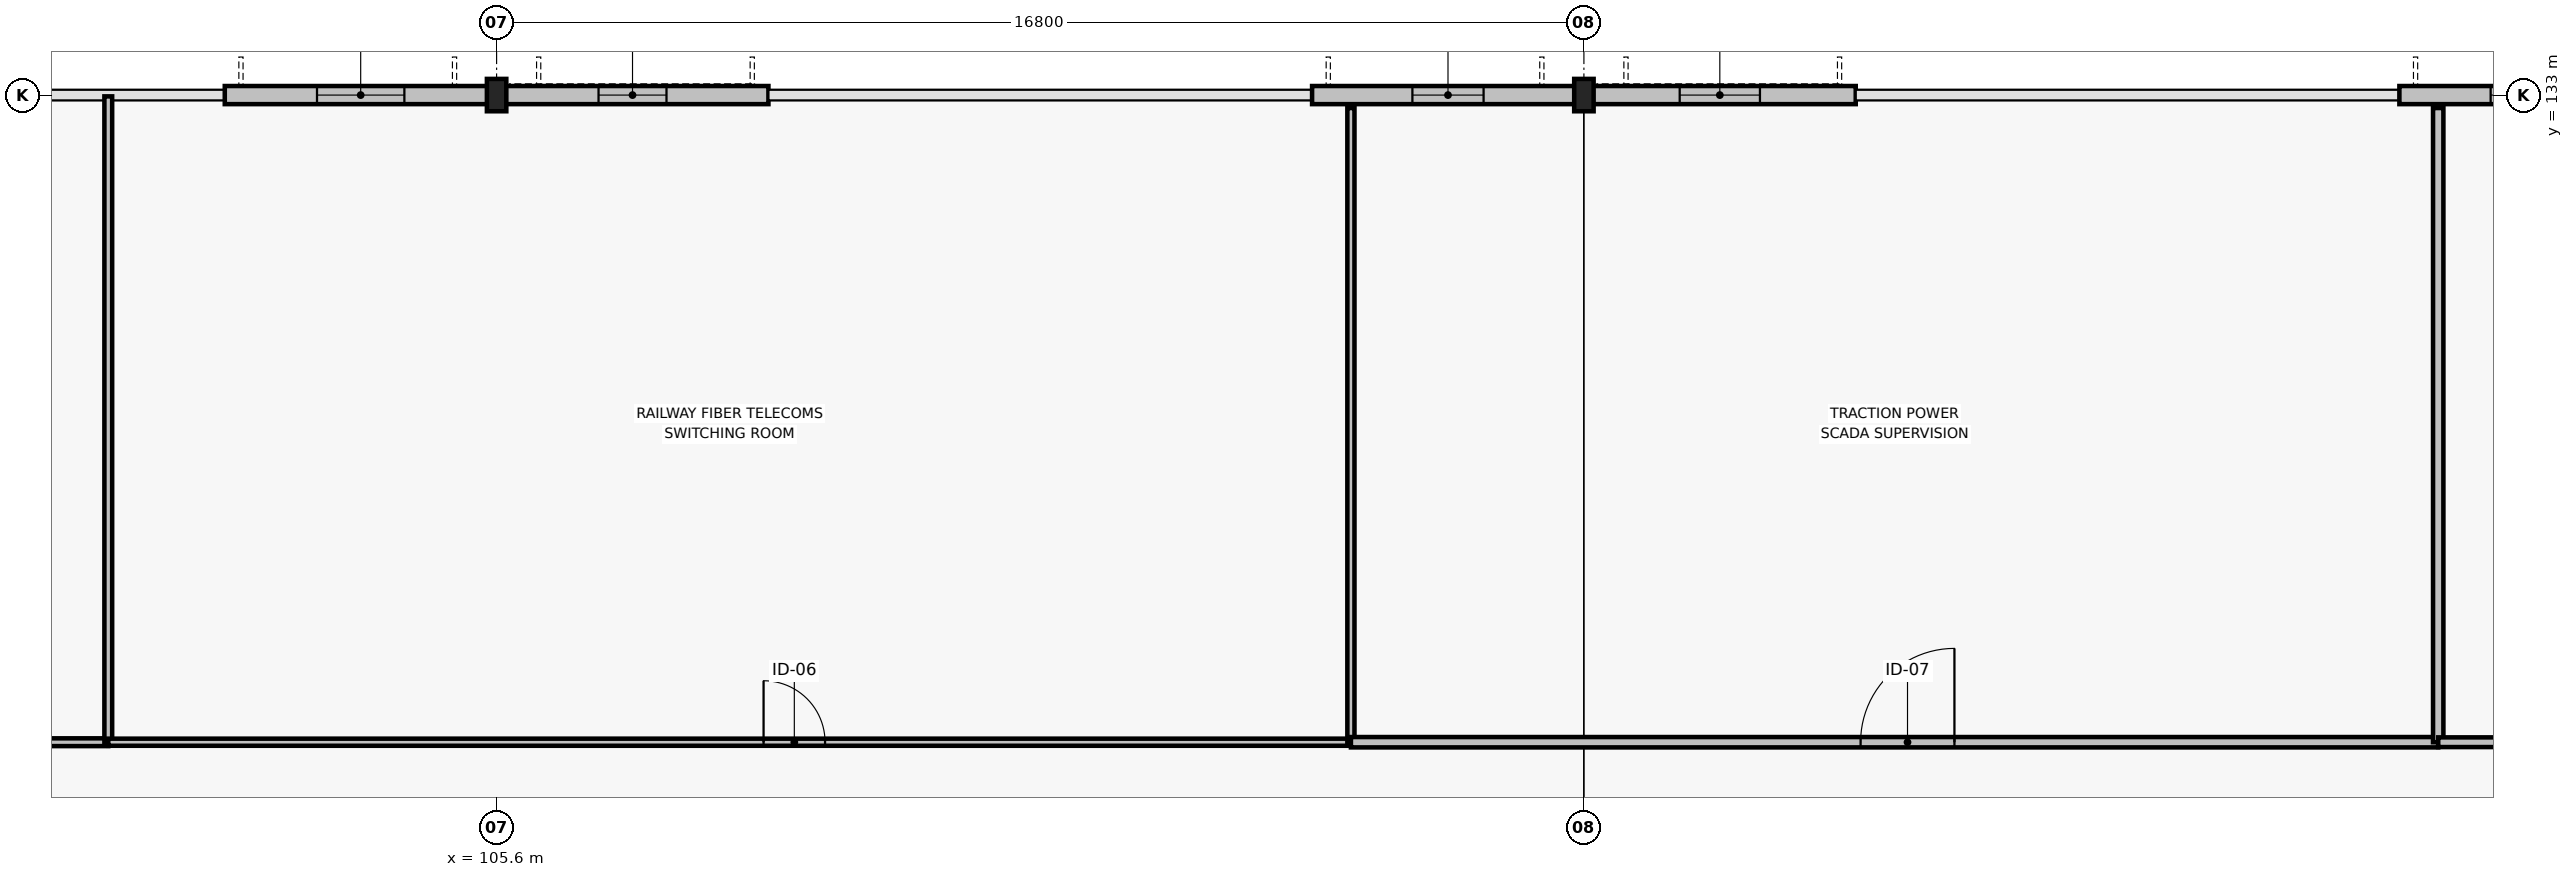
"""IFC4 building model, lengths in metres.
Left out: names, types, materials, properties, quantities, classifications, styles, units other than length and angle.
Written with IfcOpenShell. Run it as: python <this file> out.ifc"""

import sys

from ifc_helpers import new_model, si_unit, direction, frame, frame_2d, origin, origin_2d, place, context, subcontext, project, spatial, rectangle, i_section, extrude, element, fill, save


model = new_model("IFC4")
c1 = context("Model", 3, precision=1e-05, world=origin(), true_north=direction((0.0, 1.0)))
c2 = subcontext(c1, "Body", "Model", "MODEL_VIEW")
j1 = project(units=[si_unit("LENGTHUNIT", "METRE"), si_unit("PLANEANGLEUNIT", "RADIAN")], contexts=[c1])
p1 = place(None, origin())
s1 = spatial("IfcSite", under=j1, at=p1, CompositionType="ELEMENT")
p2 = place(p1, origin())
s2 = spatial("IfcBuilding", under=s1, at=p2, CompositionType="ELEMENT")
p3 = place(p2, frame((0.0, 0.0, 10.8)))
s3 = spatial("IfcBuildingStorey", under=s2, at=p3, CompositionType="ELEMENT", Elevation=10.8)
for number, where, z_axis, x_axis in (
    (1, (105.6, 133.0, 0.0), (0.0, 0.0, 1.0), (1.0, 0.0, 0.0)),
    (2, (122.4, 133.0, 0.0), (0.0, 0.0, 1.0), (1.0, 0.0, 0.0)),
):
    element("IfcColumn", number, at=place(p3, frame(where, z_axis=z_axis, x_axis=x_axis)), inside=s3, PredefinedType="COLUMN", context=c2, shape_type="SweptSolid", body=[
        extrude(i_section(OverallWidth=0.3, OverallDepth=0.5, WebThickness=0.014, FlangeThickness=0.028, FilletRadius=0.027, at=origin_2d()), origin(), (0.0, 0.0, 1.0), 6.0),
    ])
p4 = place(p3, frame((101.4, 133.0, 0.0), z_axis=(0.0, 0.0, 1.0), x_axis=(1.0, 0.0, 0.0)))
e3 = element("IfcWall", 3, at=p4, inside=s3, PredefinedType="STANDARD", context=c2, shape_type="SweptSolid", body=[
    extrude(rectangle(XDim=4.2, YDim=0.28, at=frame_2d((2.1, 0.0))), origin(), (0.0, 0.0, 1.0), 5.405),
])
p5 = place(p4, frame((1.425, 0.0, 0.8)))
e4 = element("IfcOpeningElement", 4, at=p5, cuts=e3, PredefinedType="OPENING", context=c2, shape_type="SweptSolid", body=[
    extrude(rectangle(XDim=1.35, YDim=1.4, at=frame_2d((0.675, 0.7))), frame((0.0, 0.15, 0.0), z_axis=(0.0, -1.0, 0.0), x_axis=(1.0, 0.0, 0.0)), (0.0, 0.0, 1.0), 0.3),
])
p6 = place(p3, frame((105.6, 133.0, 0.0), z_axis=(0.0, 0.0, 1.0), x_axis=(1.0, 0.0, 0.0)))
e5 = element("IfcWall", 5, at=p6, inside=s3, PredefinedType="STANDARD", context=c2, shape_type="SweptSolid", body=[
    extrude(rectangle(XDim=4.2, YDim=0.28, at=frame_2d((2.1, 0.0))), origin(), (0.0, 0.0, 1.0), 5.405),
])
p7 = place(p6, frame((1.575, 0.0, 0.8)))
e6 = element("IfcOpeningElement", 6, at=p7, cuts=e5, PredefinedType="OPENING", context=c2, shape_type="SweptSolid", body=[
    extrude(rectangle(XDim=1.05, YDim=1.35, at=frame_2d((0.525, 0.675))), frame((0.0, 0.15, 0.0), z_axis=(0.0, -1.0, 0.0), x_axis=(1.0, 0.0, 0.0)), (0.0, 0.0, 1.0), 0.3),
])
p8 = place(p3, frame((118.2, 133.0, 0.0), z_axis=(0.0, 0.0, 1.0), x_axis=(1.0, 0.0, 0.0)))
e7 = element("IfcWall", 7, at=p8, inside=s3, PredefinedType="STANDARD", context=c2, shape_type="SweptSolid", body=[
    extrude(rectangle(XDim=4.2, YDim=0.28, at=frame_2d((2.1, 0.0))), origin(), (0.0, 0.0, 1.0), 5.405),
])
p9 = place(p8, frame((1.55, 0.0, 0.8)))
e8 = element("IfcOpeningElement", 8, at=p9, cuts=e7, PredefinedType="OPENING", context=c2, shape_type="SweptSolid", body=[
    extrude(rectangle(XDim=1.1, YDim=1.25, at=frame_2d((0.55, 0.625))), frame((0.0, 0.15, 0.0), z_axis=(0.0, -1.0, 0.0), x_axis=(1.0, 0.0, 0.0)), (0.0, 0.0, 1.0), 0.3),
])
p10 = place(p3, frame((122.4, 133.0, 0.0), z_axis=(0.0, 0.0, 1.0), x_axis=(1.0, 0.0, 0.0)))
e9 = element("IfcWall", 9, at=p10, inside=s3, PredefinedType="STANDARD", context=c2, shape_type="SweptSolid", body=[
    extrude(rectangle(XDim=4.2, YDim=0.28, at=frame_2d((2.1, 0.0))), origin(), (0.0, 0.0, 1.0), 5.405),
])
p11 = place(p10, frame((1.48, 0.0, 0.8)))
e10 = element("IfcOpeningElement", 10, at=p11, cuts=e9, PredefinedType="OPENING", context=c2, shape_type="SweptSolid", body=[
    extrude(rectangle(XDim=1.24, YDim=1.31, at=frame_2d((0.62, 0.655))), frame((0.0, 0.15, 0.0), z_axis=(0.0, -1.0, 0.0), x_axis=(1.0, 0.0, 0.0)), (0.0, 0.0, 1.0), 0.3),
])
p12 = place(p3, frame((135.0, 133.0, 0.0), z_axis=(0.0, 0.0, 1.0), x_axis=(1.0, 0.0, 0.0)))
e11 = element("IfcWall", 11, at=p12, inside=s3, PredefinedType="STANDARD", context=c2, shape_type="SweptSolid", body=[
    extrude(rectangle(XDim=4.2, YDim=0.28, at=frame_2d((2.1, 0.0))), origin(), (0.0, 0.0, 1.0), 5.405),
])
p13 = place(p12, frame((1.41, 0.0, 0.8)))
e12 = element("IfcOpeningElement", 12, at=p13, cuts=e11, PredefinedType="OPENING", context=c2, shape_type="SweptSolid", body=[
    extrude(rectangle(XDim=1.38, YDim=1.37, at=frame_2d((0.69, 0.685))), frame((0.0, 0.15, 0.0), z_axis=(0.0, -1.0, 0.0), x_axis=(1.0, 0.0, 0.0)), (0.0, 0.0, 1.0), 0.3),
])
p14 = place(p3, frame((76.8, 123.0, 0.0), z_axis=(0.0, 0.0, 1.0), x_axis=(1.0, 0.0, 0.0)))
e13 = element("IfcWall", 13, at=p14, inside=s3, PredefinedType="PARTITIONING", context=c2, shape_type="SweptSolid", body=[
    extrude(rectangle(XDim=22.8, YDim=0.12, at=frame_2d((11.4, 0.0))), origin(), (0.0, 0.0, 1.0), 5.8),
])
p15 = place(p14, frame((6.9, 0.0, 0.0)))
e14 = element("IfcOpeningElement", 14, at=p15, cuts=e13, PredefinedType="OPENING", context=c2, shape_type="SweptSolid", body=[
    extrude(rectangle(XDim=1.0, YDim=2.15, at=frame_2d((0.5, 1.075))), frame((0.0, 0.07, 0.0), z_axis=(0.0, -1.0, 0.0), x_axis=(1.0, 0.0, 0.0)), (0.0, 0.0, 1.0), 0.14),
])
p16 = place(p3, frame((99.6, 123.0, 0.0), z_axis=(0.0, 0.0, 1.0), x_axis=(0.0, 1.0, 0.0)))
e15 = element("IfcWall", 15, at=p16, inside=s3, PredefinedType="PARTITIONING", context=c2, shape_type="SweptSolid", body=[
    extrude(rectangle(XDim=9.98, YDim=0.12, at=frame_2d((4.99, 0.0))), origin(), (0.0, 0.0, 1.0), 5.465),
])
p17 = place(p3, frame((99.6, 123.0, 0.0), z_axis=(0.0, 0.0, 1.0), x_axis=(1.0, 0.0, 0.0)))
e16 = element("IfcWall", 16, at=p17, inside=s3, PredefinedType="MOVABLE", context=c2, shape_type="SweptSolid", body=[
    extrude(rectangle(XDim=19.2, YDim=0.11, at=frame_2d((9.6, 0.0))), origin(), (0.0, 0.0, 1.0), 5.8),
])
p18 = place(p17, frame((10.125, 0.0, 0.0)))
e17 = element("IfcOpeningElement", 17, at=p18, cuts=e16, PredefinedType="OPENING", context=c2, shape_type="SweptSolid", body=[
    extrude(rectangle(XDim=0.95, YDim=2.15, at=frame_2d((0.475, 1.075))), frame((0.0, 0.065, 0.0), z_axis=(0.0, -1.0, 0.0), x_axis=(1.0, 0.0, 0.0)), (0.0, 0.0, 1.0), 0.13),
])
p19 = place(p3, frame((118.8, 123.0, 0.0), z_axis=(0.0, 0.0, 1.0), x_axis=(0.0, 1.0, 0.0)))
e18 = element("IfcWall", 18, at=p19, inside=s3, PredefinedType="MOVABLE", context=c2, shape_type="SweptSolid", body=[
    extrude(rectangle(XDim=9.8, YDim=0.11, at=frame_2d((4.9, 0.0))), origin(), (0.0, 0.0, 1.0), 5.8),
])
p20 = place(p3, frame((118.8, 123.0, 0.0), z_axis=(0.0, 0.0, 1.0), x_axis=(1.0, 0.0, 0.0)))
e19 = element("IfcWall", 19, at=p20, inside=s3, PredefinedType="PARTITIONING", context=c2, shape_type="SweptSolid", body=[
    extrude(rectangle(XDim=16.8, YDim=0.16, at=frame_2d((8.4, 0.0))), origin(), (0.0, 0.0, 1.0), 5.8),
])
p21 = place(p20, frame((9.325, 0.0, 0.0), z_axis=(0.0, 0.0, 1.0), x_axis=(-1.0, 0.0, 0.0)))
e20 = element("IfcOpeningElement", 20, at=p21, cuts=e19, PredefinedType="OPENING", context=c2, shape_type="SweptSolid", body=[
    extrude(rectangle(XDim=1.45, YDim=2.25, at=frame_2d((0.725, 1.125))), frame((0.0, 0.09, 0.0), z_axis=(0.0, -1.0, 0.0), x_axis=(1.0, 0.0, 0.0)), (0.0, 0.0, 1.0), 0.18),
])
p22 = place(p3, frame((135.6, 123.0, 0.0), z_axis=(0.0, 0.0, 1.0), x_axis=(0.0, 1.0, 0.0)))
e21 = element("IfcWall", 21, at=p22, inside=s3, PredefinedType="PARTITIONING", context=c2, shape_type="SweptSolid", body=[
    extrude(rectangle(XDim=9.8, YDim=0.16, at=frame_2d((4.9, 0.0))), origin(), (0.0, 0.0, 1.0), 5.8),
])
p23 = place(p3, frame((135.6, 123.0, 0.0), z_axis=(0.0, 0.0, 1.0), x_axis=(1.0, 0.0, 0.0)))
e22 = element("IfcWall", 22, at=p23, inside=s3, PredefinedType="PARTITIONING", context=c2, shape_type="SweptSolid", body=[
    extrude(rectangle(XDim=11.2, YDim=0.15, at=frame_2d((5.6, 0.0))), origin(), (0.0, 0.0, 1.0), 5.8),
])
p24 = place(p23, frame((6.15, 0.0, 0.0)))
e23 = element("IfcOpeningElement", 23, at=p24, cuts=e22, PredefinedType="OPENING", context=c2, shape_type="SweptSolid", body=[
    extrude(rectangle(XDim=1.3, YDim=2.15, at=frame_2d((0.65, 1.075))), frame((0.0, 0.085, 0.0), z_axis=(0.0, -1.0, 0.0), x_axis=(1.0, 0.0, 0.0)), (0.0, 0.0, 1.0), 0.17),
])
p25 = place(p5, origin())
e24 = element("IfcWindow", 24, at=p25, inside=s3, PartitioningType="SINGLE_PANEL", PredefinedType="WINDOW", context=c2, shape_type="SweptSolid", body=[
    extrude(rectangle(XDim=1.35, YDim=1.4, at=frame_2d((0.675, 0.7))), frame((0.0, 0.03, 0.0), z_axis=(0.0, -1.0, 0.0), x_axis=(1.0, 0.0, 0.0)), (0.0, 0.0, 1.0), 0.06),
])
fill(e4, e24)
p26 = place(p7, origin())
e25 = element("IfcWindow", 25, at=p26, inside=s3, PartitioningType="SINGLE_PANEL", PredefinedType="WINDOW", context=c2, shape_type="SweptSolid", body=[
    extrude(rectangle(XDim=1.05, YDim=1.35, at=frame_2d((0.525, 0.675))), frame((0.0, 0.03, 0.0), z_axis=(0.0, -1.0, 0.0), x_axis=(1.0, 0.0, 0.0)), (0.0, 0.0, 1.0), 0.06),
])
fill(e6, e25)
p27 = place(p9, origin())
e26 = element("IfcWindow", 26, at=p27, inside=s3, PartitioningType="SINGLE_PANEL", PredefinedType="WINDOW", context=c2, shape_type="SweptSolid", body=[
    extrude(rectangle(XDim=1.1, YDim=1.25, at=frame_2d((0.55, 0.625))), frame((0.0, 0.03, 0.0), z_axis=(0.0, -1.0, 0.0), x_axis=(1.0, 0.0, 0.0)), (0.0, 0.0, 1.0), 0.06),
])
fill(e8, e26)
p28 = place(p11, origin())
e27 = element("IfcWindow", 27, at=p28, inside=s3, PartitioningType="SINGLE_PANEL", PredefinedType="WINDOW", context=c2, shape_type="SweptSolid", body=[
    extrude(rectangle(XDim=1.24, YDim=1.31, at=frame_2d((0.62, 0.655))), frame((0.0, 0.03, 0.0), z_axis=(0.0, -1.0, 0.0), x_axis=(1.0, 0.0, 0.0)), (0.0, 0.0, 1.0), 0.06),
])
fill(e10, e27)
p29 = place(p13, origin())
e28 = element("IfcWindow", 28, at=p29, inside=s3, PartitioningType="SINGLE_PANEL", PredefinedType="WINDOW", context=c2, shape_type="SweptSolid", body=[
    extrude(rectangle(XDim=1.38, YDim=1.37, at=frame_2d((0.69, 0.685))), frame((0.0, 0.03, 0.0), z_axis=(0.0, -1.0, 0.0), x_axis=(1.0, 0.0, 0.0)), (0.0, 0.0, 1.0), 0.06),
])
fill(e12, e28)
p30 = place(p18, origin())
e29 = element("IfcDoor", 29, at=p30, inside=s3, OperationType="SINGLE_SWING_LEFT", PredefinedType="DOOR", context=c2, shape_type="SweptSolid", body=[
    extrude(rectangle(XDim=0.95, YDim=2.15, at=frame_2d((0.475, 1.075))), frame((0.0, 0.025, 0.0), z_axis=(0.0, -1.0, 0.0), x_axis=(1.0, 0.0, 0.0)), (0.0, 0.0, 1.0), 0.05),
])
fill(e17, e29)
p31 = place(p21, origin())
e30 = element("IfcDoor", 30, at=p31, inside=s3, OperationType="SINGLE_SWING_RIGHT", PredefinedType="DOOR", context=c2, shape_type="SweptSolid", body=[
    extrude(rectangle(XDim=1.45, YDim=2.25, at=frame_2d((0.725, 1.125))), frame((0.0, 0.025, 0.0), z_axis=(0.0, -1.0, 0.0), x_axis=(1.0, 0.0, 0.0)), (0.0, 0.0, 1.0), 0.05),
])
fill(e20, e30)
save(model, sys.argv[1])
